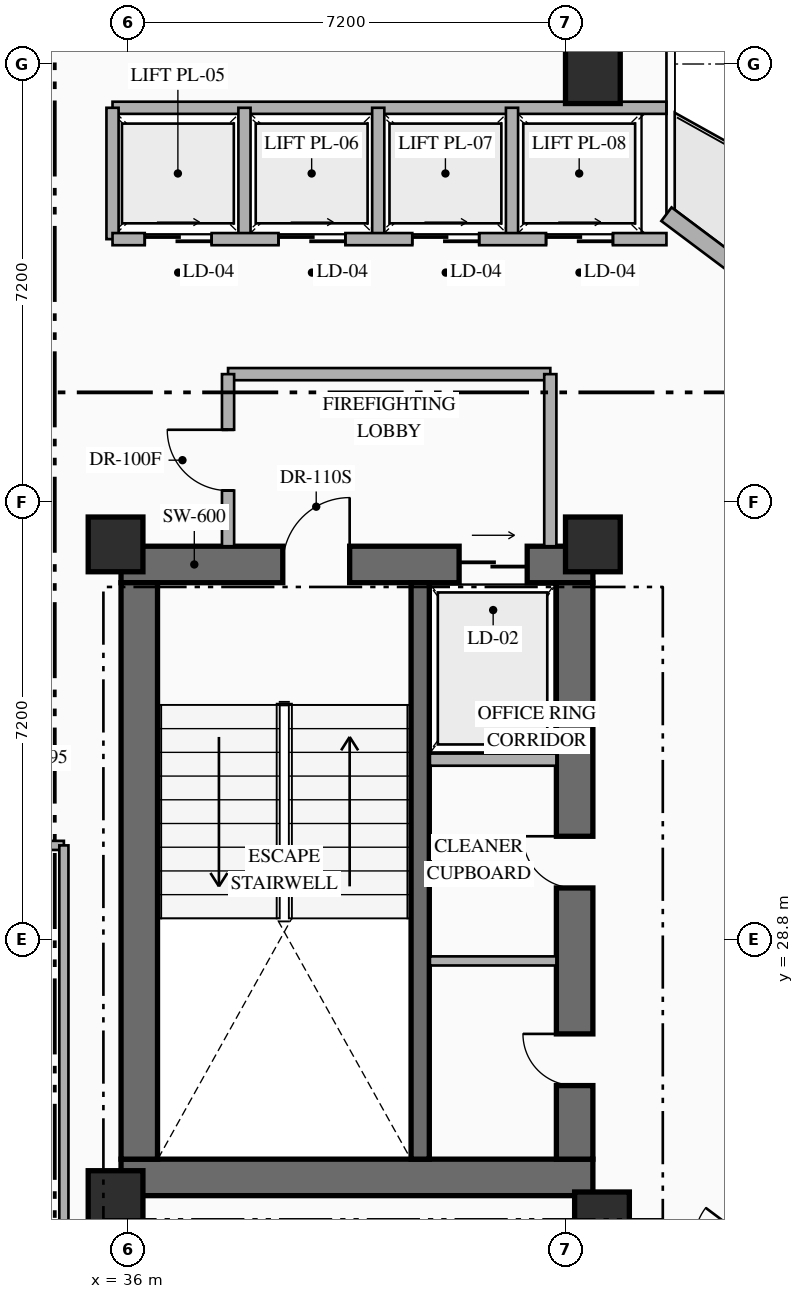
"""IFC4 building model, lengths in metres.
Left out: names, types, materials, properties, quantities, classifications, styles, units other than length and angle.
Written with IfcOpenShell. Run it as: python <this file> out.ifc"""

import sys

from ifc_helpers import new_model, si_unit, direction, frame, frame_2d, origin, origin_2d, place, context, subcontext, project, spatial, rectangle, extrude, element, fill, save


model = new_model("IFC4")
c1 = context("Model", 3, precision=1e-05, world=origin(), true_north=direction((0.0, 1.0)))
c2 = subcontext(c1, "Body", "Model", "MODEL_VIEW")
j1 = project(units=[si_unit("LENGTHUNIT", "METRE"), si_unit("PLANEANGLEUNIT", "RADIAN")], contexts=[c1])
p1 = place(None, origin())
s1 = spatial("IfcSite", under=j1, at=p1, CompositionType="ELEMENT")
p2 = place(p1, origin())
s2 = spatial("IfcBuilding", under=s1, at=p2, CompositionType="ELEMENT")
p3 = place(p2, frame((0.0, 0.0, 122.85)))
s3 = spatial("IfcBuildingStorey", under=s2, at=p3, CompositionType="ELEMENT", Elevation=122.85)
p4 = place(p3, frame((35.89, 24.89, 0.0), z_axis=(0.0, 0.0, 1.0), x_axis=(1.0, 0.0, 0.0)))
e1 = element("IfcWall", 1, at=p4, inside=s3, PredefinedType="SHEAR", context=c2, shape_type="SweptSolid", body=[
    extrude(rectangle(XDim=7.76, YDim=0.6, at=frame_2d((3.88, 0.0))), origin(), (0.0, 0.0, 1.0), 3.6),
])
p5 = place(p3, frame((35.89, 34.97, 0.0), z_axis=(0.0, 0.0, 1.0), x_axis=(1.0, 0.0, 0.0)))
e2 = element("IfcWall", 2, at=p5, inside=s3, PredefinedType="SHEAR", context=c2, shape_type="SweptSolid", body=[
    extrude(rectangle(XDim=7.76, YDim=0.6, at=frame_2d((3.88, 0.0))), origin(), (0.0, 0.0, 1.0), 3.6),
])
p6 = place(p5, frame((2.66, 0.0, 0.0)))
e3 = element("IfcOpeningElement", 3, at=p6, cuts=e2, PredefinedType="OPENING", context=c2, shape_type="SweptSolid", body=[
    extrude(rectangle(XDim=1.1, YDim=2.2, at=frame_2d((0.55, 1.1))), frame((0.0, 0.31, 0.0), z_axis=(0.0, -1.0, 0.0), x_axis=(1.0, 0.0, 0.0)), (0.0, 0.0, 1.0), 0.62),
])
p7 = place(p5, frame((5.56, 0.0, 0.0)))
e4 = element("IfcOpeningElement", 4, at=p7, cuts=e2, PredefinedType="OPENING", context=c2, shape_type="SweptSolid", body=[
    extrude(rectangle(XDim=1.12, YDim=2.15, at=frame_2d((0.56, 1.075))), frame((0.0, 0.31, 0.0), z_axis=(0.0, -1.0, 0.0), x_axis=(1.0, 0.0, 0.0)), (0.0, 0.0, 1.0), 0.62),
])
p8 = place(p3, frame((36.19, 25.19, 0.0), z_axis=(0.0, 0.0, 1.0), x_axis=(0.0, 1.0, 0.0)))
e5 = element("IfcWall", 5, at=p8, inside=s3, PredefinedType="SHEAR", context=c2, shape_type="SweptSolid", body=[
    extrude(rectangle(XDim=9.48, YDim=0.6, at=frame_2d((4.74, 0.0))), origin(), (0.0, 0.0, 1.0), 3.6),
])
p9 = place(p3, frame((43.35, 25.19, 0.0), z_axis=(0.0, 0.0, 1.0), x_axis=(0.0, 1.0, 0.0)))
e6 = element("IfcWall", 6, at=p9, inside=s3, PredefinedType="SHEAR", context=c2, shape_type="SweptSolid", body=[
    extrude(rectangle(XDim=9.48, YDim=0.6, at=frame_2d((4.74, 0.0))), origin(), (0.0, 0.0, 1.0), 3.6),
])
p10 = place(p9, frame((1.21, 0.0, 0.0)))
e7 = element("IfcOpeningElement", 7, at=p10, cuts=e6, PredefinedType="OPENING", context=c2, shape_type="SweptSolid", body=[
    extrude(rectangle(XDim=0.85, YDim=2.08, at=frame_2d((0.425, 1.04))), frame((0.0, 0.31, 0.0), z_axis=(0.0, -1.0, 0.0), x_axis=(1.0, 0.0, 0.0)), (0.0, 0.0, 1.0), 0.62),
])
p11 = place(p9, frame((4.46, 0.0, 0.0)))
e8 = element("IfcOpeningElement", 8, at=p11, cuts=e6, PredefinedType="OPENING", context=c2, shape_type="SweptSolid", body=[
    extrude(rectangle(XDim=0.85, YDim=2.08, at=frame_2d((0.425, 1.04))), frame((0.0, 0.31, 0.0), z_axis=(0.0, -1.0, 0.0), x_axis=(1.0, 0.0, 0.0)), (0.0, 0.0, 1.0), 0.62),
])
p12 = place(p3, frame((40.81, 25.19, 0.0), z_axis=(0.0, 0.0, 1.0), x_axis=(0.0, 1.0, 0.0)))
e9 = element("IfcWall", 9, at=p12, inside=s3, PredefinedType="SHEAR", context=c2, shape_type="SweptSolid", body=[
    extrude(rectangle(XDim=9.48, YDim=0.3, at=frame_2d((4.74, 0.0))), origin(), (0.0, 0.0, 1.0), 3.6),
])
for number, where, z_axis, x_axis in (
    (10, (35.8, 24.55, 0.0), (0.0, 0.0, 1.0), (1.0, 0.0, 0.0)),
    (11, (43.8, 24.2, 0.0), (0.0, 0.0, 1.0), (1.0, 0.0, 0.0)),
    (12, (35.8, 35.3, 0.0), (0.0, 0.0, 1.0), (1.0, 0.0, 0.0)),
    (13, (43.65, 35.3, 0.0), (0.0, 0.0, 1.0), (1.0, 0.0, 0.0)),
    (14, (43.65, 43.0, 0.0), (0.0, 0.0, 1.0), (1.0, 0.0, 0.0)),
):
    element("IfcColumn", number, at=place(p3, frame(where, z_axis=z_axis, x_axis=x_axis)), inside=s3, PredefinedType="COLUMN", context=c2, shape_type="SweptSolid", body=[
        extrude(rectangle(XDim=0.9, YDim=0.9, at=origin_2d()), origin(), (0.0, 0.0, 1.0), 3.6),
    ])
p13 = place(p3, frame((44.86, 40.73, 0.0), z_axis=(0.0, 0.0, 1.0), x_axis=(0.800006902154, -0.599990797017, 0.0)))
e15 = element("IfcWall", 15, at=p13, inside=s3, PredefinedType="STANDARD", context=c2, shape_type="SweptSolid", body=[
    extrude(rectangle(XDim=29.712, YDim=0.28, at=frame_2d((14.856, 0.0))), origin(), (0.0, 0.0, 1.0), 3.35),
])
p14 = place(p13, frame((14.249, 0.0, 0.0)))
e16 = element("IfcOpeningElement", 16, at=p14, cuts=e15, PredefinedType="OPENING", context=c2, shape_type="SweptSolid", body=[
    extrude(rectangle(XDim=1.1, YDim=2.2, at=frame_2d((0.55, 1.1))), frame((0.0, 0.15, 0.0), z_axis=(0.0, -1.0, 0.0), x_axis=(1.0, 0.0, 0.0)), (0.0, 0.0, 1.0), 0.3),
])
p15 = place(p13, frame((6.528, 0.0, 0.85)))
e17 = element("IfcOpeningElement", 17, at=p15, cuts=e15, PredefinedType="OPENING", context=c2, shape_type="SweptSolid", body=[
    extrude(rectangle(XDim=1.8, YDim=2.1, at=frame_2d((0.9, 1.05))), frame((0.0, 0.15, 0.0), z_axis=(0.0, -1.0, 0.0), x_axis=(1.0, 0.0, 0.0)), (0.0, 0.0, 1.0), 0.3),
])
p16 = place(p13, frame((21.384, 0.0, 0.85)))
e18 = element("IfcOpeningElement", 18, at=p16, cuts=e15, PredefinedType="OPENING", context=c2, shape_type="SweptSolid", body=[
    extrude(rectangle(XDim=1.8, YDim=2.1, at=frame_2d((0.9, 1.05))), frame((0.0, 0.15, 0.0), z_axis=(0.0, -1.0, 0.0), x_axis=(1.0, 0.0, 0.0)), (0.0, 0.0, 1.0), 0.3),
])
p17 = place(p3, frame((40.97, 31.76, 0.0), z_axis=(0.0, 0.0, 1.0), x_axis=(1.0, 0.0, 0.0)))
e19 = element("IfcWall", 19, at=p17, inside=s3, PredefinedType="STANDARD", context=c2, shape_type="SweptSolid", body=[
    extrude(rectangle(XDim=2.08, YDim=0.2, at=frame_2d((1.04, 0.0))), origin(), (0.0, 0.0, 1.0), 3.35),
])
p18 = place(p3, frame((40.97, 28.45, 0.0), z_axis=(0.0, 0.0, 1.0), x_axis=(1.0, 0.0, 0.0)))
e20 = element("IfcWall", 20, at=p18, inside=s3, PredefinedType="PARTITIONING", context=c2, shape_type="SweptSolid", body=[
    extrude(rectangle(XDim=2.08, YDim=0.15, at=frame_2d((1.04, 0.0))), origin(), (0.0, 0.0, 1.0), 3.35),
])
p19 = place(p3, frame((37.65, 38.1, 0.0), z_axis=(0.0, 0.0, 1.0), x_axis=(1.0, 0.0, 0.0)))
e21 = element("IfcWall", 21, at=p19, inside=s3, PredefinedType="STANDARD", context=c2, shape_type="SweptSolid", body=[
    extrude(rectangle(XDim=5.3, YDim=0.2, at=frame_2d((2.65, 0.0))), origin(), (0.0, 0.0, 1.0), 3.35),
])
p20 = place(p3, frame((42.95, 35.27, 0.0), z_axis=(0.0, 0.0, 1.0), x_axis=(0.0, 1.0, 0.0)))
e22 = element("IfcWall", 22, at=p20, inside=s3, PredefinedType="STANDARD", context=c2, shape_type="SweptSolid", body=[
    extrude(rectangle(XDim=2.83, YDim=0.2, at=frame_2d((1.415, 0.0))), origin(), (0.0, 0.0, 1.0), 3.35),
])
p21 = place(p3, frame((37.65, 35.27, 0.0), z_axis=(0.0, 0.0, 1.0), x_axis=(0.0, 1.0, 0.0)))
e23 = element("IfcWall", 23, at=p21, inside=s3, PredefinedType="STANDARD", context=c2, shape_type="SweptSolid", body=[
    extrude(rectangle(XDim=2.83, YDim=0.2, at=frame_2d((1.415, 0.0))), origin(), (0.0, 0.0, 1.0), 3.35),
])
p22 = place(p21, frame((0.915, 0.0, 0.0)))
e24 = element("IfcOpeningElement", 24, at=p22, cuts=e23, PredefinedType="OPENING", context=c2, shape_type="SweptSolid", body=[
    extrude(rectangle(XDim=1.0, YDim=2.2, at=frame_2d((0.5, 1.1))), frame((0.0, 0.11, 0.0), z_axis=(0.0, -1.0, 0.0), x_axis=(1.0, 0.0, 0.0)), (0.0, 0.0, 1.0), 0.22),
])
p23 = place(p3, frame((35.75, 42.48, 0.0), z_axis=(0.0, 0.0, 1.0), x_axis=(1.0, 0.0, 0.0)))
e25 = element("IfcWall", 25, at=p23, inside=s3, PredefinedType="STANDARD", context=c2, shape_type="SweptSolid", body=[
    extrude(rectangle(XDim=9.11, YDim=0.2, at=frame_2d((4.555, 0.0))), origin(), (0.0, 0.0, 1.0), 3.35),
])
for number, where, z_axis, x_axis in (
    (26, (35.75, 40.32, 0.0), (0.0, 0.0, 1.0), (0.0, 1.0, 0.0)),
    (27, (37.92, 40.32, 0.0), (0.0, 0.0, 1.0), (0.0, 1.0, 0.0)),
    (28, (40.12, 40.32, 0.0), (0.0, 0.0, 1.0), (0.0, 1.0, 0.0)),
    (29, (42.32, 40.32, 0.0), (0.0, 0.0, 1.0), (0.0, 1.0, 0.0)),
):
    element("IfcWall", number, at=place(p3, frame(where, z_axis=z_axis, x_axis=x_axis)), inside=s3, PredefinedType="STANDARD", context=c2, shape_type="SweptSolid", body=[
        extrude(rectangle(XDim=2.16, YDim=0.2, at=frame_2d((1.08, 0.0))), origin(), (0.0, 0.0, 1.0), 3.35),
    ])
p24 = place(p3, frame((35.75, 40.32, 0.0), z_axis=(0.0, 0.0, 1.0), x_axis=(1.0, 0.0, 0.0)))
e30 = element("IfcWall", 30, at=p24, inside=s3, PredefinedType="STANDARD", context=c2, shape_type="SweptSolid", body=[
    extrude(rectangle(XDim=9.11, YDim=0.2, at=frame_2d((4.555, 0.0))), origin(), (0.0, 0.0, 1.0), 3.35),
])
p25 = place(p24, frame((0.53, 0.0, 0.0)))
e31 = element("IfcOpeningElement", 31, at=p25, cuts=e30, PredefinedType="OPENING", context=c2, shape_type="SweptSolid", body=[
    extrude(rectangle(XDim=1.1, YDim=2.18, at=frame_2d((0.55, 1.09))), frame((0.0, 0.11, 0.0), z_axis=(0.0, -1.0, 0.0), x_axis=(1.0, 0.0, 0.0)), (0.0, 0.0, 1.0), 0.22),
])
p26 = place(p24, frame((2.73, 0.0, 0.0)))
e32 = element("IfcOpeningElement", 32, at=p26, cuts=e30, PredefinedType="OPENING", context=c2, shape_type="SweptSolid", body=[
    extrude(rectangle(XDim=1.1, YDim=2.18, at=frame_2d((0.55, 1.09))), frame((0.0, 0.11, 0.0), z_axis=(0.0, -1.0, 0.0), x_axis=(1.0, 0.0, 0.0)), (0.0, 0.0, 1.0), 0.22),
])
p27 = place(p24, frame((4.93, 0.0, 0.0)))
e33 = element("IfcOpeningElement", 33, at=p27, cuts=e30, PredefinedType="OPENING", context=c2, shape_type="SweptSolid", body=[
    extrude(rectangle(XDim=1.1, YDim=2.18, at=frame_2d((0.55, 1.09))), frame((0.0, 0.11, 0.0), z_axis=(0.0, -1.0, 0.0), x_axis=(1.0, 0.0, 0.0)), (0.0, 0.0, 1.0), 0.22),
])
p28 = place(p24, frame((7.13, 0.0, 0.0)))
e34 = element("IfcOpeningElement", 34, at=p28, cuts=e30, PredefinedType="OPENING", context=c2, shape_type="SweptSolid", body=[
    extrude(rectangle(XDim=1.1, YDim=2.18, at=frame_2d((0.55, 1.09))), frame((0.0, 0.11, 0.0), z_axis=(0.0, -1.0, 0.0), x_axis=(1.0, 0.0, 0.0)), (0.0, 0.0, 1.0), 0.22),
])
p29 = place(p3, frame((30.5, 30.35, 0.0), z_axis=(0.0, 0.0, 1.0), x_axis=(1.0, 0.0, 0.0)))
e35 = element("IfcWall", 35, at=p29, inside=s3, PredefinedType="PARTITIONING", context=c2, shape_type="SweptSolid", body=[
    extrude(rectangle(XDim=4.45, YDim=0.15, at=frame_2d((2.225, 0.0))), origin(), (0.0, 0.0, 1.0), 3.35),
])
p30 = place(p29, frame((2.846, 0.0, 0.0)))
e36 = element("IfcOpeningElement", 36, at=p30, cuts=e35, PredefinedType="OPENING", context=c2, shape_type="SweptSolid", body=[
    extrude(rectangle(XDim=0.95, YDim=2.15, at=frame_2d((0.475, 1.075))), frame((0.0, 0.085, 0.0), z_axis=(0.0, -1.0, 0.0), x_axis=(1.0, 0.0, 0.0)), (0.0, 0.0, 1.0), 0.17),
])
p31 = place(p3, frame((34.95, 23.2, 0.0), z_axis=(0.0, 0.0, 1.0), x_axis=(0.0, 1.0, 0.0)))
e37 = element("IfcWall", 37, at=p31, inside=s3, PredefinedType="PARTITIONING", context=c2, shape_type="SweptSolid", body=[
    extrude(rectangle(XDim=7.15, YDim=0.15, at=frame_2d((3.575, 0.0))), origin(), (0.0, 0.0, 1.0), 3.35),
])
p32 = place(p3, frame((44.24, 21.12, 0.0), z_axis=(0.0, 0.0, 1.0), x_axis=(0.600006735006, 0.799994948701, 0.0)))
e38 = element("IfcWall", 38, at=p32, inside=s3, PredefinedType="PARTITIONING", context=c2, shape_type="SweptSolid", body=[
    extrude(rectangle(XDim=5.8, YDim=0.15, at=frame_2d((2.9, 0.0))), origin(), (0.0, 0.0, 1.0), 3.35),
])
p33 = place(p32, frame((2.425, 0.0, 0.0)))
e39 = element("IfcOpeningElement", 39, at=p33, cuts=e38, PredefinedType="OPENING", context=c2, shape_type="SweptSolid", body=[
    extrude(rectangle(XDim=0.95, YDim=2.15, at=frame_2d((0.475, 1.075))), frame((0.0, 0.085, 0.0), z_axis=(0.0, -1.0, 0.0), x_axis=(1.0, 0.0, 0.0)), (0.0, 0.0, 1.0), 0.17),
])
p34 = place(p6, origin())
e40 = element("IfcDoor", 40, at=p34, inside=s3, OperationType="SINGLE_SWING_RIGHT", PredefinedType="DOOR", context=c2, shape_type="SweptSolid", body=[
    extrude(rectangle(XDim=1.1, YDim=2.2, at=frame_2d((0.55, 1.1))), frame((0.0, 0.025, 0.0), z_axis=(0.0, -1.0, 0.0), x_axis=(1.0, 0.0, 0.0)), (0.0, 0.0, 1.0), 0.05),
])
fill(e3, e40)
p35 = place(p7, origin())
e41 = element("IfcDoor", 41, at=p35, inside=s3, OperationType="SLIDING_TO_RIGHT", PredefinedType="USERDEFINED", context=c2, shape_type="SweptSolid", body=[
    extrude(rectangle(XDim=1.12, YDim=2.15, at=frame_2d((0.56, 1.075))), frame((0.0, 0.025, 0.0), z_axis=(0.0, -1.0, 0.0), x_axis=(1.0, 0.0, 0.0)), (0.0, 0.0, 1.0), 0.05),
])
fill(e4, e41)
p36 = place(p10, origin())
e42 = element("IfcDoor", 42, at=p36, inside=s3, OperationType="SINGLE_SWING_RIGHT", PredefinedType="DOOR", context=c2, shape_type="SweptSolid", body=[
    extrude(rectangle(XDim=0.85, YDim=2.08, at=frame_2d((0.425, 1.04))), frame((0.0, 0.025, 0.0), z_axis=(0.0, -1.0, 0.0), x_axis=(1.0, 0.0, 0.0)), (0.0, 0.0, 1.0), 0.05),
])
fill(e7, e42)
p37 = place(p11, origin())
e43 = element("IfcDoor", 43, at=p37, inside=s3, OperationType="SINGLE_SWING_RIGHT", PredefinedType="DOOR", context=c2, shape_type="SweptSolid", body=[
    extrude(rectangle(XDim=0.85, YDim=2.08, at=frame_2d((0.425, 1.04))), frame((0.0, 0.025, 0.0), z_axis=(0.0, -1.0, 0.0), x_axis=(1.0, 0.0, 0.0)), (0.0, 0.0, 1.0), 0.05),
])
fill(e8, e43)
p38 = place(p22, origin())
e44 = element("IfcDoor", 44, at=p38, inside=s3, OperationType="SINGLE_SWING_RIGHT", PredefinedType="DOOR", context=c2, shape_type="SweptSolid", body=[
    extrude(rectangle(XDim=1.0, YDim=2.2, at=frame_2d((0.5, 1.1))), frame((0.0, 0.025, 0.0), z_axis=(0.0, -1.0, 0.0), x_axis=(1.0, 0.0, 0.0)), (0.0, 0.0, 1.0), 0.05),
])
fill(e24, e44)
p39 = place(p25, origin())
e45 = element("IfcDoor", 45, at=p39, inside=s3, OperationType="SLIDING_TO_RIGHT", PredefinedType="USERDEFINED", context=c2, shape_type="SweptSolid", body=[
    extrude(rectangle(XDim=1.1, YDim=2.18, at=frame_2d((0.55, 1.09))), frame((0.0, 0.025, 0.0), z_axis=(0.0, -1.0, 0.0), x_axis=(1.0, 0.0, 0.0)), (0.0, 0.0, 1.0), 0.05),
])
fill(e31, e45)
p40 = place(p26, origin())
e46 = element("IfcDoor", 46, at=p40, inside=s3, OperationType="SLIDING_TO_RIGHT", PredefinedType="USERDEFINED", context=c2, shape_type="SweptSolid", body=[
    extrude(rectangle(XDim=1.1, YDim=2.18, at=frame_2d((0.55, 1.09))), frame((0.0, 0.025, 0.0), z_axis=(0.0, -1.0, 0.0), x_axis=(1.0, 0.0, 0.0)), (0.0, 0.0, 1.0), 0.05),
])
fill(e32, e46)
p41 = place(p27, origin())
e47 = element("IfcDoor", 47, at=p41, inside=s3, OperationType="SLIDING_TO_RIGHT", PredefinedType="USERDEFINED", context=c2, shape_type="SweptSolid", body=[
    extrude(rectangle(XDim=1.1, YDim=2.18, at=frame_2d((0.55, 1.09))), frame((0.0, 0.025, 0.0), z_axis=(0.0, -1.0, 0.0), x_axis=(1.0, 0.0, 0.0)), (0.0, 0.0, 1.0), 0.05),
])
fill(e33, e47)
p42 = place(p28, origin())
e48 = element("IfcDoor", 48, at=p42, inside=s3, OperationType="SLIDING_TO_RIGHT", PredefinedType="USERDEFINED", context=c2, shape_type="SweptSolid", body=[
    extrude(rectangle(XDim=1.1, YDim=2.18, at=frame_2d((0.55, 1.09))), frame((0.0, 0.025, 0.0), z_axis=(0.0, -1.0, 0.0), x_axis=(1.0, 0.0, 0.0)), (0.0, 0.0, 1.0), 0.05),
])
fill(e34, e48)
save(model, sys.argv[1])
